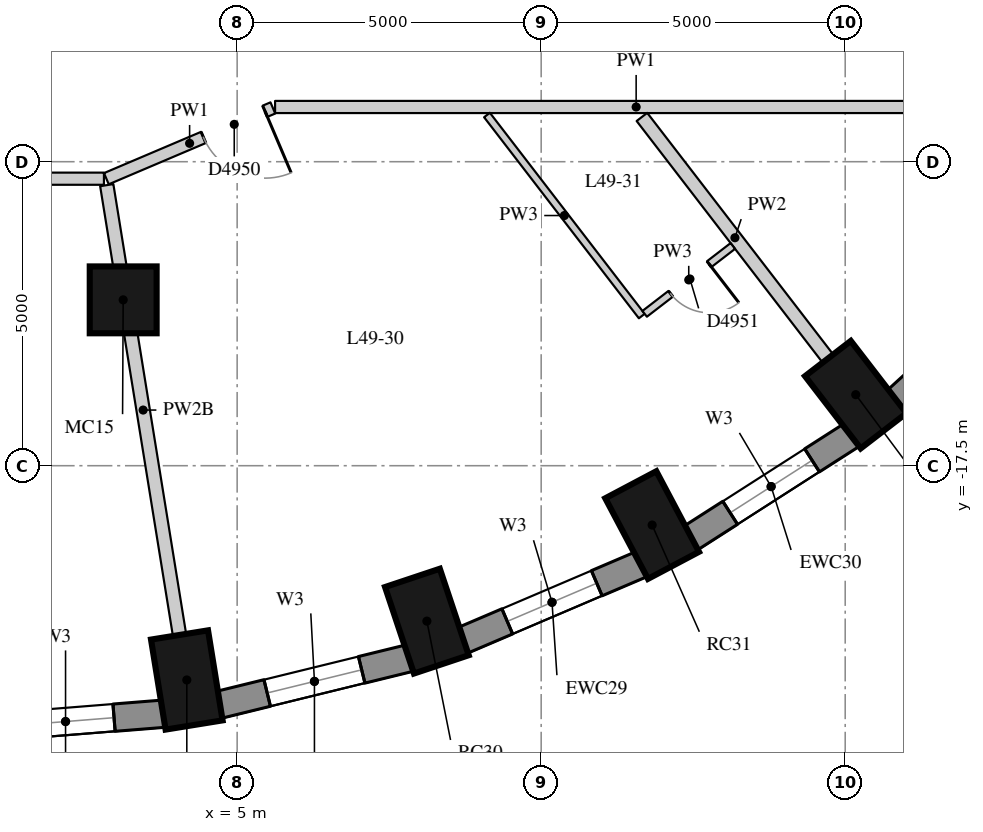
"""IFC4 building model, lengths in metres.
Left out: names, types, materials, properties, quantities, classifications, styles, units other than length and angle.
Written with IfcOpenShell. Run it as: python <this file> out.ifc"""

import sys

from ifc_helpers import new_model, si_unit, direction, frame, frame_2d, origin, origin_2d, place, context, subcontext, project, spatial, rectangle, extrude, element, fill, save


model = new_model("IFC4")
c1 = context("Model", 3, precision=1e-05, world=origin(), true_north=direction((0.0, 1.0)))
c2 = subcontext(c1, "Body", "Model", "MODEL_VIEW")
j1 = project(units=[si_unit("LENGTHUNIT", "METRE"), si_unit("PLANEANGLEUNIT", "RADIAN")], contexts=[c1])
p1 = place(None, origin())
s1 = spatial("IfcSite", under=j1, at=p1, CompositionType="ELEMENT")
p2 = place(p1, origin())
s2 = spatial("IfcBuilding", under=s1, at=p2, CompositionType="ELEMENT")
p3 = place(p2, frame((0.0, 0.0, 174.8)))
s3 = spatial("IfcBuildingStorey", under=s2, at=p3, CompositionType="ELEMENT", Elevation=174.8)
for number, where, z_axis, x_axis in (
    (1, (4.172, -21.024, 0.0), (0.0, 0.0, 1.0), (0.16, -0.987, 0.0)),
    (2, (8.12, -20.056, 0.0), (0.0, 0.0, 1.0), (0.317, -0.949, 0.0)),
    (3, (11.825, -18.476, 0.0), (0.0, 0.0, 1.0), (0.468, -0.884, 0.0)),
    (4, (15.173, -16.332, 0.0), (0.0, 0.0, 1.0), (0.61, -0.792, 0.0)),
):
    element("IfcColumn", number, at=place(p3, frame(where, z_axis=z_axis, x_axis=x_axis)), inside=s3, PredefinedType="COLUMN", context=c2, shape_type="SweptSolid", body=[
        extrude(rectangle(XDim=1.5, YDim=0.95, at=origin_2d()), origin(), (0.0, 0.0, 1.0), 3.3),
    ])
p4 = place(p3, frame((3.126, -14.772, 0.0), z_axis=(0.0, 0.0, 1.0), x_axis=(1.0, 0.0, 0.0)))
e5 = element("IfcColumn", 5, at=p4, inside=s3, PredefinedType="COLUMN", context=c2, shape_type="SweptSolid", body=[
    extrude(rectangle(XDim=1.1, YDim=1.1, at=origin_2d()), origin(), (0.0, 0.0, 1.0), 3.3),
])
p5 = place(p3, frame((0.555, -21.838, 0.0), z_axis=(0.0, 0.0, 1.0), x_axis=(0.996812416891, 0.079780984773, 0.0)))
e6 = element("IfcWall", 6, at=p5, inside=s3, PredefinedType="SOLIDWALL", context=c2, shape_type="SweptSolid", body=[
    extrude(rectangle(XDim=3.256, YDim=0.45, at=frame_2d((1.628, 0.0))), origin(), (0.0, 0.0, 1.0), 3.02),
])
p6 = place(p5, frame((0.828, 0.0, 0.4)))
e7 = element("IfcOpeningElement", 7, at=p6, cuts=e6, PredefinedType="OPENING", context=c2, shape_type="SweptSolid", body=[
    extrude(rectangle(XDim=1.6, YDim=1.75, at=frame_2d((0.8, 0.875))), frame((0.0, 0.235, 0.0), z_axis=(0.0, -1.0, 0.0), x_axis=(1.0, 0.0, 0.0)), (0.0, 0.0, 1.0), 0.47),
])
p7 = place(p3, frame((4.699, -21.433, 0.0), z_axis=(0.0, 0.0, 1.0), x_axis=(0.971237178372, 0.238114139328, 0.0)))
e8 = element("IfcWall", 8, at=p7, inside=s3, PredefinedType="SOLIDWALL", context=c2, shape_type="SweptSolid", body=[
    extrude(rectangle(XDim=3.237, YDim=0.45, at=frame_2d((1.618, 0.0))), origin(), (0.0, 0.0, 1.0), 3.02),
])
p8 = place(p7, frame((0.818, 0.0, 0.4)))
e9 = element("IfcOpeningElement", 9, at=p8, cuts=e8, PredefinedType="OPENING", context=c2, shape_type="SweptSolid", body=[
    extrude(rectangle(XDim=1.6, YDim=1.75, at=frame_2d((0.8, 0.875))), frame((0.0, 0.235, 0.0), z_axis=(0.0, -1.0, 0.0), x_axis=(1.0, 0.0, 0.0)), (0.0, 0.0, 1.0), 0.47),
])
p9 = place(p3, frame((8.706, -20.375, 0.0), z_axis=(0.0, 0.0, 1.0), x_axis=(0.91981046949, 0.392362969986, 0.0)))
e10 = element("IfcWall", 10, at=p9, inside=s3, PredefinedType="SOLIDWALL", context=c2, shape_type="SweptSolid", body=[
    extrude(rectangle(XDim=3.201, YDim=0.45, at=frame_2d((1.6, 0.0))), origin(), (0.0, 0.0, 1.0), 3.02),
])
p10 = place(p9, frame((0.8, 0.0, 0.4)))
e11 = element("IfcOpeningElement", 11, at=p10, cuts=e10, PredefinedType="OPENING", context=c2, shape_type="SweptSolid", body=[
    extrude(rectangle(XDim=1.6, YDim=1.75, at=frame_2d((0.8, 0.875))), frame((0.0, 0.235, 0.0), z_axis=(0.0, -1.0, 0.0), x_axis=(1.0, 0.0, 0.0)), (0.0, 0.0, 1.0), 0.47),
])
p11 = place(p3, frame((12.455, -18.693, 0.0), z_axis=(0.0, 0.0, 1.0), x_axis=(0.842065914439, 0.539374633943, 0.0)))
e12 = element("IfcWall", 12, at=p11, inside=s3, PredefinedType="SOLIDWALL", context=c2, shape_type="SweptSolid", body=[
    extrude(rectangle(XDim=3.151, YDim=0.45, at=frame_2d((1.576, 0.0))), origin(), (0.0, 0.0, 1.0), 3.02),
])
p12 = place(p11, frame((0.776, 0.0, 0.4)))
e13 = element("IfcOpeningElement", 13, at=p12, cuts=e12, PredefinedType="OPENING", context=c2, shape_type="SweptSolid", body=[
    extrude(rectangle(XDim=1.6, YDim=1.75, at=frame_2d((0.8, 0.875))), frame((0.0, 0.235, 0.0), z_axis=(0.0, -1.0, 0.0), x_axis=(1.0, 0.0, 0.0)), (0.0, 0.0, 1.0), 0.47),
])
p13 = place(p3, frame((15.83, -16.439, 0.0), z_axis=(0.0, 0.0, 1.0), x_axis=(0.737808755941, 0.675009807082, 0.0)))
e14 = element("IfcWall", 14, at=p13, inside=s3, PredefinedType="SOLIDWALL", context=c2, shape_type="SweptSolid", body=[
    extrude(rectangle(XDim=3.094, YDim=0.45, at=frame_2d((1.547, 0.0))), origin(), (0.0, 0.0, 1.0), 3.02),
])
p14 = place(p3, frame((17.5, -11.6, 0.0), z_axis=(0.0, 0.0, 1.0), x_axis=(-1.0, 0.0, 0.0)))
e15 = element("IfcWall", 15, at=p14, inside=s3, PredefinedType="PARTITIONING", context=c2, shape_type="SweptSolid", body=[
    extrude(rectangle(XDim=11.876, YDim=0.2, at=frame_2d((5.938, 0.0))), origin(), (0.0, 0.0, 1.0), 3.02),
])
p15 = place(p3, frame((5.587, -11.616, 0.0), z_axis=(0.0, 0.0, 1.0), x_axis=(-0.920312454828, -0.391184081334, 0.0)))
e16 = element("IfcWall", 16, at=p15, inside=s3, PredefinedType="PARTITIONING", context=c2, shape_type="SweptSolid", body=[
    extrude(rectangle(XDim=2.975, YDim=0.2, at=frame_2d((1.488, 0.0))), origin(), (0.0, 0.0, 1.0), 3.02),
])
p16 = place(p15, frame((0.14, 0.0, 0.0)))
e17 = element("IfcOpeningElement", 17, at=p16, cuts=e16, PredefinedType="OPENING", context=c2, shape_type="SweptSolid", body=[
    extrude(rectangle(XDim=1.1, YDim=2.1, at=frame_2d((0.55, 1.05))), frame((0.0, 0.11, 0.0), z_axis=(0.0, -1.0, 0.0), x_axis=(1.0, 0.0, 0.0)), (0.0, 0.0, 1.0), 0.22),
])
p17 = place(p3, frame((2.809, -12.78, 0.0), z_axis=(0.0, 0.0, 1.0), x_axis=(-1.0, 0.0, 0.0)))
e18 = element("IfcWall", 18, at=p17, inside=s3, PredefinedType="PARTITIONING", context=c2, shape_type="SweptSolid", body=[
    extrude(rectangle(XDim=5.458, YDim=0.2, at=frame_2d((2.729, 0.0))), origin(), (0.0, 0.0, 1.0), 3.02),
])
p18 = place(p17, frame((2.179, 0.0, 0.0)))
e19 = element("IfcOpeningElement", 19, at=p18, cuts=e18, PredefinedType="OPENING", context=c2, shape_type="SweptSolid", body=[
    extrude(rectangle(XDim=1.1, YDim=2.1, at=frame_2d((0.55, 1.05))), frame((0.0, 0.11, 0.0), z_axis=(0.0, -1.0, 0.0), x_axis=(1.0, 0.0, 0.0)), (0.0, 0.0, 1.0), 0.22),
])
p19 = place(p3, frame((4.052, -20.284, 0.0), z_axis=(0.0, 0.0, 1.0), x_axis=(-0.159690244465, 0.987167172176, 0.0)))
e20 = element("IfcWall", 20, at=p19, inside=s3, PredefinedType="PARTITIONING", context=c2, shape_type="SweptSolid", body=[
    extrude(rectangle(XDim=7.494, YDim=0.22, at=frame_2d((3.747, 0.0))), origin(), (0.0, 0.0, 1.0), 2.57),
])
p20 = place(p3, frame((14.716, -15.737, 0.0), z_axis=(0.0, 0.0, 1.0), x_axis=(-0.609986007715, 0.792412184657, 0.0)))
e21 = element("IfcWall", 21, at=p20, inside=s3, PredefinedType="PARTITIONING", context=c2, shape_type="SweptSolid", body=[
    extrude(rectangle(XDim=5.015, YDim=0.22, at=frame_2d((2.507, 0.0))), origin(), (0.0, 0.0, 1.0), 3.02),
])
p21 = place(p3, frame((9.109, -11.732, 0.0), z_axis=(0.0, 0.0, 1.0), x_axis=(0.609996270026, -0.79240428479, 0.0)))
e22 = element("IfcWall", 22, at=p21, inside=s3, PredefinedType="PARTITIONING", context=c2, shape_type="SweptSolid", body=[
    extrude(rectangle(XDim=4.173, YDim=0.12, at=frame_2d((2.087, 0.0))), origin(), (0.0, 0.0, 1.0), 3.02),
])
p22 = place(p3, frame((11.702, -15.002, 0.0), z_axis=(0.0, 0.0, 1.0), x_axis=(0.792395776304, 0.610007322657, 0.0)))
e23 = element("IfcWall", 23, at=p22, inside=s3, PredefinedType="PARTITIONING", context=c2, shape_type="SweptSolid", body=[
    extrude(rectangle(XDim=1.83, YDim=0.12, at=frame_2d((0.915, 0.0))), origin(), (0.0, 0.0, 1.0), 3.02),
])
p23 = place(p22, frame((0.54, 0.0, 0.0)))
e24 = element("IfcOpeningElement", 24, at=p23, cuts=e23, PredefinedType="OPENING", context=c2, shape_type="SweptSolid", body=[
    extrude(rectangle(XDim=0.8, YDim=2.1, at=frame_2d((0.4, 1.05))), frame((0.0, 0.07, 0.0), z_axis=(0.0, -1.0, 0.0), x_axis=(1.0, 0.0, 0.0)), (0.0, 0.0, 1.0), 0.14),
])
p24 = place(p6, origin())
e25 = element("IfcWindow", 25, at=p24, inside=s3, PartitioningType="SINGLE_PANEL", PredefinedType="WINDOW", context=c2, shape_type="SweptSolid", body=[
    extrude(rectangle(XDim=1.6, YDim=1.75, at=frame_2d((0.8, 0.875))), frame((0.0, 0.035, 0.0), z_axis=(0.0, -1.0, 0.0), x_axis=(1.0, 0.0, 0.0)), (0.0, 0.0, 1.0), 0.06),
])
fill(e7, e25)
p25 = place(p8, origin())
e26 = element("IfcWindow", 26, at=p25, inside=s3, PartitioningType="SINGLE_PANEL", PredefinedType="WINDOW", context=c2, shape_type="SweptSolid", body=[
    extrude(rectangle(XDim=1.6, YDim=1.75, at=frame_2d((0.8, 0.875))), frame((0.0, 0.035, 0.0), z_axis=(0.0, -1.0, 0.0), x_axis=(1.0, 0.0, 0.0)), (0.0, 0.0, 1.0), 0.06),
])
fill(e9, e26)
p26 = place(p10, origin())
e27 = element("IfcWindow", 27, at=p26, inside=s3, PartitioningType="SINGLE_PANEL", PredefinedType="WINDOW", context=c2, shape_type="SweptSolid", body=[
    extrude(rectangle(XDim=1.6, YDim=1.75, at=frame_2d((0.8, 0.875))), frame((0.0, 0.035, 0.0), z_axis=(0.0, -1.0, 0.0), x_axis=(1.0, 0.0, 0.0)), (0.0, 0.0, 1.0), 0.06),
])
fill(e11, e27)
p27 = place(p12, origin())
e28 = element("IfcWindow", 28, at=p27, inside=s3, PartitioningType="SINGLE_PANEL", PredefinedType="WINDOW", context=c2, shape_type="SweptSolid", body=[
    extrude(rectangle(XDim=1.6, YDim=1.75, at=frame_2d((0.8, 0.875))), frame((0.0, 0.035, 0.0), z_axis=(0.0, -1.0, 0.0), x_axis=(1.0, 0.0, 0.0)), (0.0, 0.0, 1.0), 0.06),
])
fill(e13, e28)
p28 = place(p16, origin())
e29 = element("IfcDoor", 29, at=p28, inside=s3, OperationType="SINGLE_SWING_LEFT", PredefinedType="DOOR", context=c2, shape_type="SweptSolid", body=[
    extrude(rectangle(XDim=1.1, YDim=2.1, at=frame_2d((0.55, 1.05))), frame((0.0, 0.025, 0.0), z_axis=(0.0, -1.0, 0.0), x_axis=(1.0, 0.0, 0.0)), (0.0, 0.0, 1.0), 0.05),
])
fill(e17, e29)
p29 = place(p23, origin())
e30 = element("IfcDoor", 30, at=p29, inside=s3, OperationType="SINGLE_SWING_LEFT", PredefinedType="DOOR", context=c2, shape_type="SweptSolid", body=[
    extrude(rectangle(XDim=0.8, YDim=2.1, at=frame_2d((0.4, 1.05))), frame((0.0, 0.025, 0.0), z_axis=(0.0, -1.0, 0.0), x_axis=(1.0, 0.0, 0.0)), (0.0, 0.0, 1.0), 0.05),
])
fill(e24, e30)
save(model, sys.argv[1])
